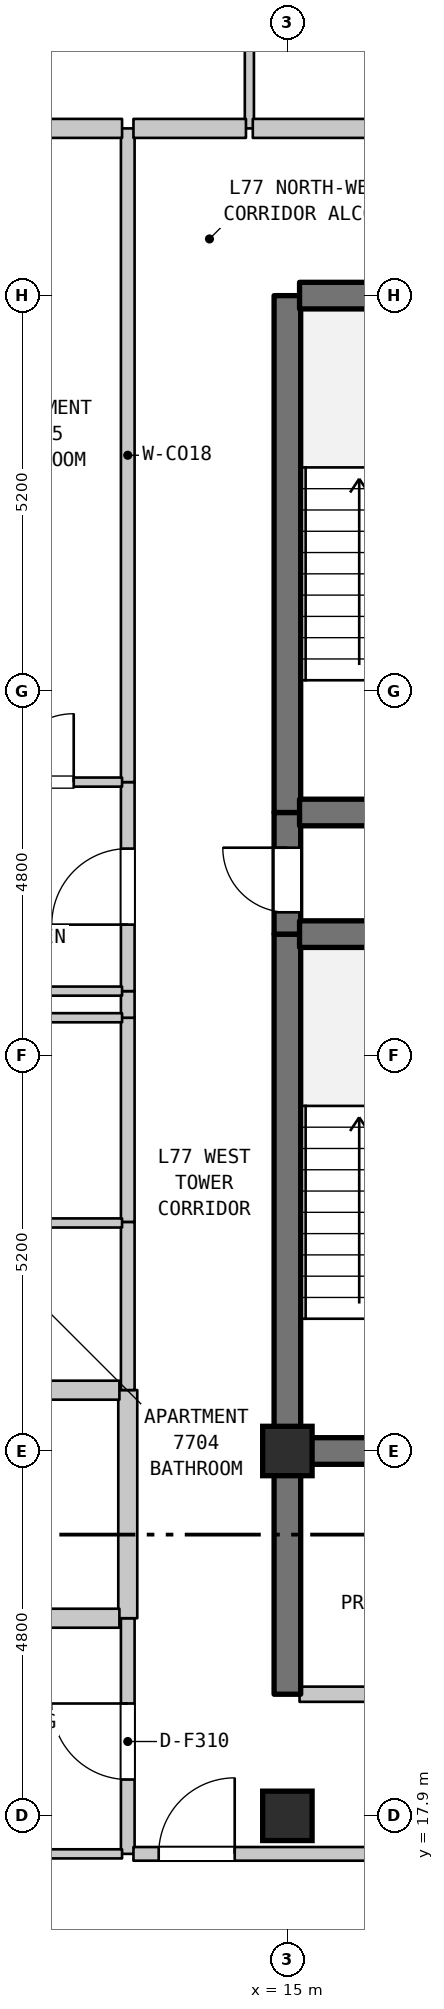
"""IFC4 building model, lengths in metres.
Left out: names, types, materials, properties, quantities, classifications, styles, units other than length and angle.
Written with IfcOpenShell. Run it as: python <this file> out.ifc"""

import sys

from ifc_helpers import new_model, si_unit, direction, frame, frame_2d, origin, origin_2d, place, context, subcontext, project, spatial, rectangle, extrude, element, fill, save


model = new_model("IFC4")
c1 = context("Model", 3, precision=1e-05, world=origin(), true_north=direction((0.0, 1.0)))
c2 = subcontext(c1, "Body", "Model", "MODEL_VIEW")
j1 = project(units=[si_unit("LENGTHUNIT", "METRE"), si_unit("PLANEANGLEUNIT", "RADIAN")], contexts=[c1])
p1 = place(None, origin())
s1 = spatial("IfcSite", under=j1, at=p1, CompositionType="ELEMENT")
p2 = place(p1, origin())
s2 = spatial("IfcBuilding", under=s1, at=p2, CompositionType="ELEMENT")
p3 = place(p2, frame((0.0, 0.0, 307.3)))
s3 = spatial("IfcBuildingStorey", under=s2, at=p3, CompositionType="ELEMENT", Elevation=307.3)
for number, where, z_axis, x_axis in (
    (1, (15.0, 17.9, 0.0), (0.0, 0.0, 1.0), (1.0, 0.0, 0.0)),
    (2, (15.0, 22.7, 0.0), (0.0, 0.0, 1.0), (1.0, 0.0, 0.0)),
):
    element("IfcColumn", number, at=place(p3, frame(where, z_axis=z_axis, x_axis=x_axis)), inside=s3, PredefinedType="COLUMN", context=c2, shape_type="SweptSolid", body=[
        extrude(rectangle(XDim=0.65, YDim=0.65, at=origin_2d()), origin(), (0.0, 0.0, 1.0), 3.7),
    ])
p4 = place(p3, frame((12.9, 17.4, 0.0), z_axis=(0.0, 0.0, 1.0), x_axis=(0.0, 1.0, 0.0)))
e3 = element("IfcWall", 3, at=p4, inside=s3, PredefinedType="STANDARD", context=c2, shape_type="SweptSolid", body=[
    extrude(rectangle(XDim=3.1, YDim=0.18, at=frame_2d((1.55, 0.0))), origin(), (0.0, 0.0, 1.0), 3.39),
])
p5 = place(p4, frame((0.978, 0.0, 0.0)))
e4 = element("IfcOpeningElement", 4, at=p5, cuts=e3, PredefinedType="OPENING", context=c2, shape_type="SweptSolid", body=[
    extrude(rectangle(XDim=1.0, YDim=2.15, at=frame_2d((0.5, 1.075))), frame((0.0, 0.1, 0.0), z_axis=(0.0, -1.0, 0.0), x_axis=(1.0, 0.0, 0.0)), (0.0, 0.0, 1.0), 0.2),
])
p6 = place(p3, frame((12.9, 20.5, 0.0), z_axis=(0.0, 0.0, 1.0), x_axis=(0.0, 1.0, 0.0)))
e5 = element("IfcWall", 5, at=p6, inside=s3, PredefinedType="STANDARD", context=c2, shape_type="SweptSolid", body=[
    extrude(rectangle(XDim=3.002, YDim=0.25, at=frame_2d((1.501, 0.0))), origin(), (0.0, 0.0, 1.0), 3.39),
])
p7 = place(p3, frame((12.9, 23.502, 0.0), z_axis=(0.0, 0.0, 1.0), x_axis=(0.0, 1.0, 0.0)))
e6 = element("IfcWall", 6, at=p7, inside=s3, PredefinedType="STANDARD", context=c2, shape_type="SweptSolid", body=[
    extrude(rectangle(XDim=2.212, YDim=0.18, at=frame_2d((1.106, 0.0))), origin(), (0.0, 0.0, 1.0), 3.39),
])
p8 = place(p3, frame((12.9, 25.714, 0.0), z_axis=(0.0, 0.0, 1.0), x_axis=(0.0, 1.0, 0.0)))
e7 = element("IfcWall", 7, at=p8, inside=s3, PredefinedType="STANDARD", context=c2, shape_type="SweptSolid", body=[
    extrude(rectangle(XDim=2.686, YDim=0.18, at=frame_2d((1.343, 0.0))), origin(), (0.0, 0.0, 1.0), 3.39),
])
p9 = place(p3, frame((12.9, 28.4, 0.0), z_axis=(0.0, 0.0, 1.0), x_axis=(0.0, 1.0, 0.0)))
e8 = element("IfcWall", 8, at=p9, inside=s3, PredefinedType="STANDARD", context=c2, shape_type="SweptSolid", body=[
    extrude(rectangle(XDim=0.35, YDim=0.18, at=frame_2d((0.175, 0.0))), origin(), (0.0, 0.0, 1.0), 3.39),
])
p10 = place(p3, frame((12.9, 28.75, 0.0), z_axis=(0.0, 0.0, 1.0), x_axis=(0.0, 1.0, 0.0)))
e9 = element("IfcWall", 9, at=p10, inside=s3, PredefinedType="STANDARD", context=c2, shape_type="SweptSolid", body=[
    extrude(rectangle(XDim=2.75, YDim=0.18, at=frame_2d((1.375, 0.0))), origin(), (0.0, 0.0, 1.0), 3.39),
])
p11 = place(p10, frame((0.875, 0.0, 0.0)))
e10 = element("IfcOpeningElement", 10, at=p11, cuts=e9, PredefinedType="OPENING", context=c2, shape_type="SweptSolid", body=[
    extrude(rectangle(XDim=1.0, YDim=2.15, at=frame_2d((0.5, 1.075))), frame((0.0, 0.1, 0.0), z_axis=(0.0, -1.0, 0.0), x_axis=(1.0, 0.0, 0.0)), (0.0, 0.0, 1.0), 0.2),
])
p12 = place(p3, frame((12.9, 31.5, 0.0), z_axis=(0.0, 0.0, 1.0), x_axis=(0.0, 1.0, 0.0)))
e11 = element("IfcWall", 11, at=p12, inside=s3, PredefinedType="STANDARD", context=c2, shape_type="SweptSolid", body=[
    extrude(rectangle(XDim=8.6, YDim=0.18, at=frame_2d((4.3, 0.0))), origin(), (0.0, 0.0, 1.0), 3.39),
])
p13 = place(p3, frame((14.5, 40.1, 0.0), z_axis=(0.0, 0.0, 1.0), x_axis=(0.0, 1.0, 0.0)))
e12 = element("IfcWall", 12, at=p13, inside=s3, PredefinedType="PARTITIONING", context=c2, shape_type="SweptSolid", body=[
    extrude(rectangle(XDim=4.2, YDim=0.12, at=frame_2d((2.1, 0.0))), origin(), (0.0, 0.0, 1.0), 3.39),
])
p14 = place(p3, frame((15.0, 19.5, 0.0), z_axis=(0.0, 0.0, 1.0), x_axis=(0.0, 1.0, 0.0)))
e13 = element("IfcWall", 13, at=p14, inside=s3, PredefinedType="SHEAR", context=c2, shape_type="SweptSolid", body=[
    extrude(rectangle(XDim=3.2, YDim=0.35, at=frame_2d((1.6, 0.0))), origin(), (0.0, 0.0, 1.0), 3.39),
])
p15 = place(p3, frame((15.0, 22.7, 0.0), z_axis=(0.0, 0.0, 1.0), x_axis=(0.0, 1.0, 0.0)))
e14 = element("IfcWall", 14, at=p15, inside=s3, PredefinedType="SHEAR", context=c2, shape_type="SweptSolid", body=[
    extrude(rectangle(XDim=6.8, YDim=0.35, at=frame_2d((3.4, 0.0))), origin(), (0.0, 0.0, 1.0), 3.39),
])
p16 = place(p3, frame((15.0, 29.5, 0.0), z_axis=(0.0, 0.0, 1.0), x_axis=(0.0, 1.0, 0.0)))
e15 = element("IfcWall", 15, at=p16, inside=s3, PredefinedType="SHEAR", context=c2, shape_type="SweptSolid", body=[
    extrude(rectangle(XDim=1.6, YDim=0.35, at=frame_2d((0.8, 0.0))), origin(), (0.0, 0.0, 1.0), 3.39),
])
p17 = place(p16, frame((0.287, 0.0, 0.0)))
e16 = element("IfcOpeningElement", 16, at=p17, cuts=e15, PredefinedType="OPENING", context=c2, shape_type="SweptSolid", body=[
    extrude(rectangle(XDim=0.85, YDim=2.1, at=frame_2d((0.425, 1.05))), frame((0.0, 0.185, 0.0), z_axis=(0.0, -1.0, 0.0), x_axis=(1.0, 0.0, 0.0)), (0.0, 0.0, 1.0), 0.37),
])
p18 = place(p3, frame((15.0, 31.1, 0.0), z_axis=(0.0, 0.0, 1.0), x_axis=(0.0, 1.0, 0.0)))
e17 = element("IfcWall", 17, at=p18, inside=s3, PredefinedType="SHEAR", context=c2, shape_type="SweptSolid", body=[
    extrude(rectangle(XDim=6.8, YDim=0.35, at=frame_2d((3.4, 0.0))), origin(), (0.0, 0.0, 1.0), 3.39),
])
p19 = place(p3, frame((8.973, 17.4, 0.0), z_axis=(0.0, 0.0, 1.0), x_axis=(1.0, 0.0, 0.0)))
e18 = element("IfcWall", 18, at=p19, inside=s3, PredefinedType="PARTITIONING", context=c2, shape_type="SweptSolid", body=[
    extrude(rectangle(XDim=3.852, YDim=0.12, at=frame_2d((1.926, 0.0))), origin(), (0.0, 0.0, 1.0), 3.39),
])
p20 = place(p3, frame((12.975, 17.4, 0.0), z_axis=(0.0, 0.0, 1.0), x_axis=(1.0, 0.0, 0.0)))
e19 = element("IfcWall", 19, at=p20, inside=s3, PredefinedType="STANDARD", context=c2, shape_type="SweptSolid", body=[
    extrude(rectangle(XDim=3.18, YDim=0.18, at=frame_2d((1.59, 0.0))), origin(), (0.0, 0.0, 1.0), 3.39),
])
p21 = place(p20, frame((0.332, 0.0, 0.0)))
e20 = element("IfcOpeningElement", 20, at=p21, cuts=e19, PredefinedType="OPENING", context=c2, shape_type="SweptSolid", body=[
    extrude(rectangle(XDim=1.0, YDim=2.15, at=frame_2d((0.5, 1.075))), frame((0.0, 0.1, 0.0), z_axis=(0.0, -1.0, 0.0), x_axis=(1.0, 0.0, 0.0)), (0.0, 0.0, 1.0), 0.2),
])
p22 = place(p3, frame((15.16, 19.5, 0.0), z_axis=(0.0, 0.0, 1.0), x_axis=(1.0, 0.0, 0.0)))
e21 = element("IfcWall", 21, at=p22, inside=s3, PredefinedType="STANDARD", context=c2, shape_type="SweptSolid", body=[
    extrude(rectangle(XDim=3.68, YDim=0.2, at=frame_2d((1.84, 0.0))), origin(), (0.0, 0.0, 1.0), 3.39),
])
p23 = place(p22, frame((1.39, 0.0, 0.0)))
e22 = element("IfcOpeningElement", 22, at=p23, cuts=e21, PredefinedType="OPENING", context=c2, shape_type="SweptSolid", body=[
    extrude(rectangle(XDim=0.9, YDim=2.15, at=frame_2d((0.45, 1.075))), frame((0.0, 0.11, 0.0), z_axis=(0.0, -1.0, 0.0), x_axis=(1.0, 0.0, 0.0)), (0.0, 0.0, 1.0), 0.22),
])
p24 = place(p3, frame((10.76, 20.5, 0.0), z_axis=(0.0, 0.0, 1.0), x_axis=(1.0, 0.0, 0.0)))
e23 = element("IfcWall", 23, at=p24, inside=s3, PredefinedType="STANDARD", context=c2, shape_type="SweptSolid", body=[
    extrude(rectangle(XDim=2.03, YDim=0.25, at=frame_2d((1.015, 0.0))), origin(), (0.0, 0.0, 1.0), 3.39),
])
p25 = place(p3, frame((15.16, 22.7, 0.0), z_axis=(0.0, 0.0, 1.0), x_axis=(1.0, 0.0, 0.0)))
e24 = element("IfcWall", 24, at=p25, inside=s3, PredefinedType="SHEAR", context=c2, shape_type="SweptSolid", body=[
    extrude(rectangle(XDim=3.68, YDim=0.35, at=frame_2d((1.84, 0.0))), origin(), (0.0, 0.0, 1.0), 3.39),
])
p26 = place(p3, frame((10.76, 23.5, 0.0), z_axis=(0.0, 0.0, 1.0), x_axis=(1.0, 0.0, 0.0)))
e25 = element("IfcWall", 25, at=p26, inside=s3, PredefinedType="STANDARD", context=c2, shape_type="SweptSolid", body=[
    extrude(rectangle(XDim=2.03, YDim=0.25, at=frame_2d((1.015, 0.0))), origin(), (0.0, 0.0, 1.0), 3.39),
])
for number, where, z_axis, x_axis in (
    (26, (10.695, 25.7, 0.0), (0.0, 0.0, 1.0), (1.0, 0.0, 0.0)),
    (27, (10.695, 28.4, 0.0), (0.0, 0.0, 1.0), (1.0, 0.0, 0.0)),
):
    element("IfcWall", number, at=place(p3, frame(where, z_axis=z_axis, x_axis=x_axis)), inside=s3, PredefinedType="PARTITIONING", context=c2, shape_type="SweptSolid", body=[
        extrude(rectangle(XDim=2.13, YDim=0.12, at=frame_2d((1.065, 0.0))), origin(), (0.0, 0.0, 1.0), 3.39),
    ])
p27 = place(p3, frame((9.175, 28.75, 0.0), z_axis=(0.0, 0.0, 1.0), x_axis=(1.0, 0.0, 0.0)))
e28 = element("IfcWall", 28, at=p27, inside=s3, PredefinedType="PARTITIONING", context=c2, shape_type="SweptSolid", body=[
    extrude(rectangle(XDim=3.65, YDim=0.12, at=frame_2d((1.825, 0.0))), origin(), (0.0, 0.0, 1.0), 3.39),
])
for number, where, z_axis, x_axis in (
    (29, (15.16, 29.5, 0.0), (0.0, 0.0, 1.0), (1.0, 0.0, 0.0)),
    (30, (15.16, 31.1, 0.0), (0.0, 0.0, 1.0), (1.0, 0.0, 0.0)),
):
    element("IfcWall", number, at=place(p3, frame(where, z_axis=z_axis, x_axis=x_axis)), inside=s3, PredefinedType="SHEAR", context=c2, shape_type="SweptSolid", body=[
        extrude(rectangle(XDim=3.68, YDim=0.35, at=frame_2d((1.84, 0.0))), origin(), (0.0, 0.0, 1.0), 3.39),
    ])
p28 = place(p3, frame((10.623, 31.5, 0.0), z_axis=(0.0, 0.0, 1.0), x_axis=(1.0, 0.0, 0.0)))
e31 = element("IfcWall", 31, at=p28, inside=s3, PredefinedType="PARTITIONING", context=c2, shape_type="SweptSolid", body=[
    extrude(rectangle(XDim=2.202, YDim=0.12, at=frame_2d((1.101, 0.0))), origin(), (0.0, 0.0, 1.0), 3.39),
])
p29 = place(p28, frame((0.666, 0.0, 0.0)))
e32 = element("IfcOpeningElement", 32, at=p29, cuts=e31, PredefinedType="OPENING", context=c2, shape_type="SweptSolid", body=[
    extrude(rectangle(XDim=0.9, YDim=2.1, at=frame_2d((0.45, 1.05))), frame((0.0, 0.07, 0.0), z_axis=(0.0, -1.0, 0.0), x_axis=(1.0, 0.0, 0.0)), (0.0, 0.0, 1.0), 0.14),
])
p30 = place(p3, frame((15.16, 37.9, 0.0), z_axis=(0.0, 0.0, 1.0), x_axis=(1.0, 0.0, 0.0)))
e33 = element("IfcWall", 33, at=p30, inside=s3, PredefinedType="SHEAR", context=c2, shape_type="SweptSolid", body=[
    extrude(rectangle(XDim=3.68, YDim=0.35, at=frame_2d((1.84, 0.0))), origin(), (0.0, 0.0, 1.0), 3.39),
])
p31 = place(p3, frame((10.623, 40.1, 0.0), z_axis=(0.0, 0.0, 1.0), x_axis=(1.0, 0.0, 0.0)))
e34 = element("IfcWall", 34, at=p31, inside=s3, PredefinedType="STANDARD", context=c2, shape_type="SweptSolid", body=[
    extrude(rectangle(XDim=2.202, YDim=0.25, at=frame_2d((1.101, 0.0))), origin(), (0.0, 0.0, 1.0), 3.39),
])
p32 = place(p3, frame((12.975, 40.1, 0.0), z_axis=(0.0, 0.0, 1.0), x_axis=(1.0, 0.0, 0.0)))
e35 = element("IfcWall", 35, at=p32, inside=s3, PredefinedType="STANDARD", context=c2, shape_type="SweptSolid", body=[
    extrude(rectangle(XDim=1.48, YDim=0.25, at=frame_2d((0.74, 0.0))), origin(), (0.0, 0.0, 1.0), 3.39),
])
p33 = place(p3, frame((14.545, 40.1, 0.0), z_axis=(0.0, 0.0, 1.0), x_axis=(1.0, 0.0, 0.0)))
e36 = element("IfcWall", 36, at=p33, inside=s3, PredefinedType="STANDARD", context=c2, shape_type="SweptSolid", body=[
    extrude(rectangle(XDim=8.495, YDim=0.25, at=frame_2d((4.248, 0.0))), origin(), (0.0, 0.0, 1.0), 3.39),
])
p34 = place(p5, origin())
e37 = element("IfcDoor", 37, at=p34, inside=s3, OperationType="SINGLE_SWING_RIGHT", PredefinedType="DOOR", context=c2, shape_type="SweptSolid", body=[
    extrude(rectangle(XDim=1.0, YDim=2.15, at=frame_2d((0.5, 1.075))), frame((0.0, 0.025, 0.0), z_axis=(0.0, -1.0, 0.0), x_axis=(1.0, 0.0, 0.0)), (0.0, 0.0, 1.0), 0.05),
])
fill(e4, e37)
p35 = place(p11, origin())
e38 = element("IfcDoor", 38, at=p35, inside=s3, OperationType="SINGLE_SWING_LEFT", PredefinedType="DOOR", context=c2, shape_type="SweptSolid", body=[
    extrude(rectangle(XDim=1.0, YDim=2.15, at=frame_2d((0.5, 1.075))), frame((0.0, 0.025, 0.0), z_axis=(0.0, -1.0, 0.0), x_axis=(1.0, 0.0, 0.0)), (0.0, 0.0, 1.0), 0.05),
])
fill(e10, e38)
p36 = place(p17, origin())
e39 = element("IfcDoor", 39, at=p36, inside=s3, OperationType="SINGLE_SWING_RIGHT", PredefinedType="DOOR", context=c2, shape_type="SweptSolid", body=[
    extrude(rectangle(XDim=0.85, YDim=2.1, at=frame_2d((0.425, 1.05))), frame((0.0, 0.025, 0.0), z_axis=(0.0, -1.0, 0.0), x_axis=(1.0, 0.0, 0.0)), (0.0, 0.0, 1.0), 0.05),
])
fill(e16, e39)
p37 = place(p21, origin())
e40 = element("IfcDoor", 40, at=p37, inside=s3, OperationType="SINGLE_SWING_RIGHT", PredefinedType="DOOR", context=c2, shape_type="SweptSolid", body=[
    extrude(rectangle(XDim=1.0, YDim=2.15, at=frame_2d((0.5, 1.075))), frame((0.0, 0.025, 0.0), z_axis=(0.0, -1.0, 0.0), x_axis=(1.0, 0.0, 0.0)), (0.0, 0.0, 1.0), 0.05),
])
fill(e20, e40)
p38 = place(p29, origin())
e41 = element("IfcDoor", 41, at=p38, inside=s3, OperationType="SINGLE_SWING_RIGHT", PredefinedType="DOOR", context=c2, shape_type="SweptSolid", body=[
    extrude(rectangle(XDim=0.9, YDim=2.1, at=frame_2d((0.45, 1.05))), frame((0.0, 0.025, 0.0), z_axis=(0.0, -1.0, 0.0), x_axis=(1.0, 0.0, 0.0)), (0.0, 0.0, 1.0), 0.05),
])
fill(e32, e41)
save(model, sys.argv[1])
